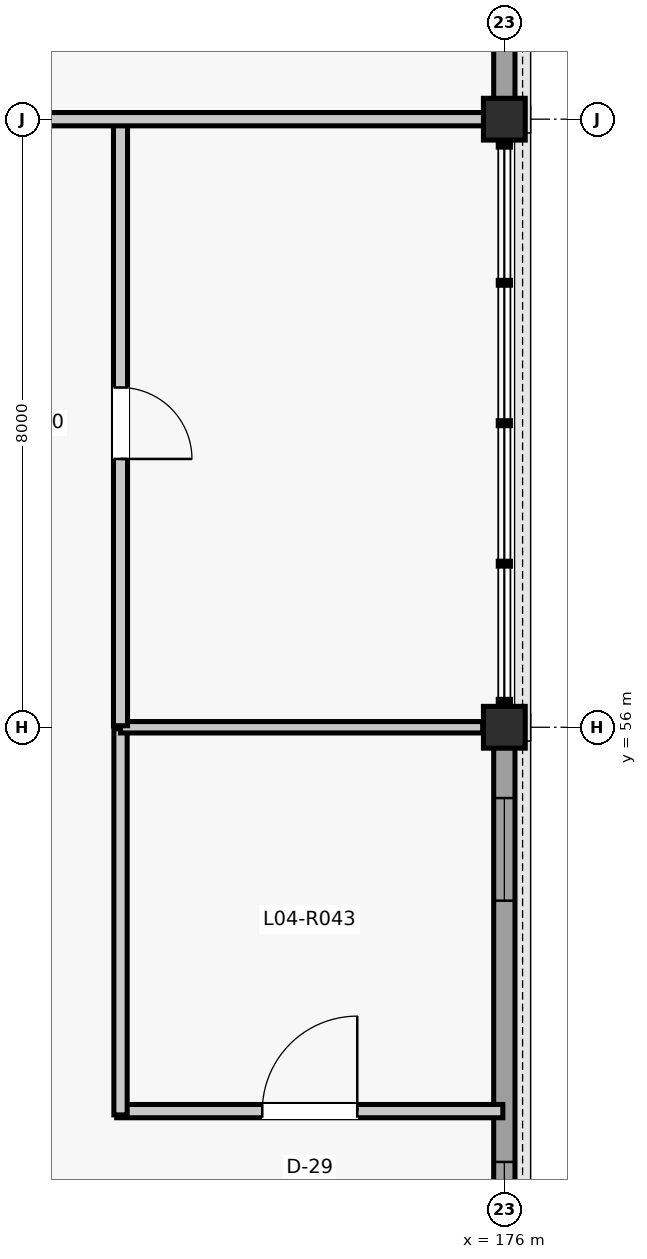
"""IFC4 building model, lengths in metres.
Left out: names, types, materials, properties, quantities, classifications, styles, units other than length and angle.
Written with IfcOpenShell. Run it as: python <this file> out.ifc"""

import sys

from ifc_helpers import new_model, si_unit, direction, frame, frame_2d, origin, origin_2d, place, context, subcontext, project, spatial, rectangle, extrude, element, fill, save


model = new_model("IFC4")
c1 = context("Model", 3, precision=1e-05, world=origin(), true_north=direction((0.0, 1.0)))
c2 = subcontext(c1, "Body", "Model", "MODEL_VIEW")
j1 = project(units=[si_unit("LENGTHUNIT", "METRE"), si_unit("PLANEANGLEUNIT", "RADIAN")], contexts=[c1])
p1 = place(None, origin())
s1 = spatial("IfcSite", under=j1, at=p1, CompositionType="ELEMENT")
p2 = place(p1, origin())
s2 = spatial("IfcBuilding", under=s1, at=p2, CompositionType="ELEMENT")
p3 = place(p2, frame((0.0, 0.0, 17.82)))
s3 = spatial("IfcBuildingStorey", under=s2, at=p3, CompositionType="ELEMENT", Elevation=17.82)
for number, where, z_axis, x_axis in (
    (1, (176.0, 56.0, 0.0), (0.0, 0.0, 1.0), (1.0, 0.0, 0.0)),
    (2, (176.0, 64.0, 0.0), (0.0, 0.0, 1.0), (1.0, 0.0, 0.0)),
):
    element("IfcColumn", number, at=place(p3, frame(where, z_axis=z_axis, x_axis=x_axis)), inside=s3, PredefinedType="COLUMN", context=c2, shape_type="SweptSolid", body=[
        extrude(rectangle(XDim=0.55, YDim=0.55, at=origin_2d()), origin(), (0.0, 0.0, 1.0), 3.96),
    ])
p4 = place(p3, frame((176.0, 48.26, 0.0), z_axis=(0.0, 0.0, 1.0), x_axis=(0.0, 1.0, 0.0)))
e3 = element("IfcWall", 3, at=p4, inside=s3, PredefinedType="SOLIDWALL", context=c2, shape_type="SweptSolid", body=[
    extrude(rectangle(XDim=7.48, YDim=0.28, at=frame_2d((3.74, 0.0))), origin(), (0.0, 0.0, 1.0), 3.285),
])
p5 = place(p4, frame((0.671, 0.0, 0.95)))
e4 = element("IfcOpeningElement", 4, at=p5, cuts=e3, PredefinedType="OPENING", context=c2, shape_type="SweptSolid", body=[
    extrude(rectangle(XDim=1.35, YDim=1.9, at=frame_2d((0.675, 0.95))), frame((0.0, 0.15, 0.0), z_axis=(0.0, -1.0, 0.0), x_axis=(1.0, 0.0, 0.0)), (0.0, 0.0, 1.0), 0.3),
])
p6 = place(p4, frame((5.458, 0.0, 0.95)))
e5 = element("IfcOpeningElement", 5, at=p6, cuts=e3, PredefinedType="OPENING", context=c2, shape_type="SweptSolid", body=[
    extrude(rectangle(XDim=1.35, YDim=1.9, at=frame_2d((0.675, 0.95))), frame((0.0, 0.15, 0.0), z_axis=(0.0, -1.0, 0.0), x_axis=(1.0, 0.0, 0.0)), (0.0, 0.0, 1.0), 0.3),
])
p7 = place(p3, frame((176.0, 64.26, 0.0), z_axis=(0.0, 0.0, 1.0), x_axis=(0.0, 1.0, 0.0)))
e6 = element("IfcWall", 6, at=p7, inside=s3, PredefinedType="SOLIDWALL", context=c2, shape_type="SweptSolid", body=[
    extrude(rectangle(XDim=7.48, YDim=0.28, at=frame_2d((3.74, 0.0))), origin(), (0.0, 0.0, 1.0), 3.289),
])
p8 = place(p7, frame((2.64, 0.0, 0.9)))
e7 = element("IfcOpeningElement", 7, at=p8, cuts=e6, PredefinedType="OPENING", context=c2, shape_type="SweptSolid", body=[
    extrude(rectangle(XDim=2.2, YDim=2.0, at=frame_2d((1.1, 1.0))), frame((0.0, 0.15, 0.0), z_axis=(0.0, -1.0, 0.0), x_axis=(1.0, 0.0, 0.0)), (0.0, 0.0, 1.0), 0.3),
])
p9 = place(p3, frame((170.9, 50.95, 0.0), z_axis=(0.0, 0.0, 1.0), x_axis=(1.0, 0.0, 0.0)))
e8 = element("IfcWall", 8, at=p9, inside=s3, PredefinedType="PARTITIONING", context=c2, shape_type="SweptSolid", body=[
    extrude(rectangle(XDim=5.08, YDim=0.175, at=frame_2d((2.54, 0.0))), origin(), (0.0, 0.0, 1.0), 3.278),
])
p10 = place(p9, frame((1.915, 0.0, 0.0)))
e9 = element("IfcOpeningElement", 9, at=p10, cuts=e8, PredefinedType="OPENING", context=c2, shape_type="SweptSolid", body=[
    extrude(rectangle(XDim=1.25, YDim=2.18, at=frame_2d((0.625, 1.09))), frame((0.0, 0.097, 0.0), z_axis=(0.0, -1.0, 0.0), x_axis=(1.0, 0.0, 0.0)), (0.0, 0.0, 1.0), 0.195),
])
p11 = place(p3, frame((170.95, 50.9, 0.0), z_axis=(0.0, 0.0, 1.0), x_axis=(0.0, 1.0, 0.0)))
e10 = element("IfcWall", 10, at=p11, inside=s3, PredefinedType="PARTITIONING", context=c2, shape_type="SweptSolid", body=[
    extrude(rectangle(XDim=5.08, YDim=0.175, at=frame_2d((2.54, 0.0))), origin(), (0.0, 0.0, 1.0), 3.232),
])
p12 = place(p3, frame((170.95, 56.0, 0.0), z_axis=(0.0, 0.0, 1.0), x_axis=(1.0, 0.0, 0.0)))
e11 = element("IfcWall", 11, at=p12, inside=s3, PredefinedType="PARTITIONING", context=c2, shape_type="SweptSolid", body=[
    extrude(rectangle(XDim=4.765, YDim=0.15, at=frame_2d((2.383, 0.0))), origin(), (0.0, 0.0, 1.0), 3.232),
])
p13 = place(p3, frame((170.95, 56.02, 0.0), z_axis=(0.0, 0.0, 1.0), x_axis=(0.0, 1.0, 0.0)))
e12 = element("IfcWall", 12, at=p13, inside=s3, PredefinedType="PARTITIONING", context=c2, shape_type="SweptSolid", body=[
    extrude(rectangle(XDim=7.96, YDim=0.185, at=frame_2d((3.98, 0.0))), origin(), (0.0, 0.0, 1.0), 3.232),
])
p14 = place(p13, frame((3.51, 0.0, 0.0)))
e13 = element("IfcOpeningElement", 13, at=p14, cuts=e12, PredefinedType="OPENING", context=c2, shape_type="SweptSolid", body=[
    extrude(rectangle(XDim=0.94, YDim=2.12, at=frame_2d((0.47, 1.06))), frame((0.0, 0.103, 0.0), z_axis=(0.0, -1.0, 0.0), x_axis=(1.0, 0.0, 0.0)), (0.0, 0.0, 1.0), 0.205),
])
p15 = place(p3, frame((168.265, 64.0, 0.0), z_axis=(0.0, 0.0, 1.0), x_axis=(1.0, 0.0, 0.0)))
e14 = element("IfcWall", 14, at=p15, inside=s3, PredefinedType="PARTITIONING", context=c2, shape_type="SweptSolid", body=[
    extrude(rectangle(XDim=7.47, YDim=0.175, at=frame_2d((3.735, 0.0))), origin(), (0.0, 0.0, 1.0), 3.238),
])
p16 = place(p15, frame((0.52, 0.0, 0.0)))
e15 = element("IfcOpeningElement", 15, at=p16, cuts=e14, PredefinedType="OPENING", context=c2, shape_type="SweptSolid", body=[
    extrude(rectangle(XDim=0.94, YDim=2.12, at=frame_2d((0.47, 1.06))), frame((0.0, 0.097, 0.0), z_axis=(0.0, -1.0, 0.0), x_axis=(1.0, 0.0, 0.0)), (0.0, 0.0, 1.0), 0.195),
])
p17 = place(p5, origin())
e16 = element("IfcWindow", 16, at=p17, inside=s3, PartitioningType="SINGLE_PANEL", PredefinedType="WINDOW", context=c2, shape_type="SweptSolid", body=[
    extrude(rectangle(XDim=1.35, YDim=1.9, at=frame_2d((0.675, 0.95))), frame((0.0, 0.03, 0.0), z_axis=(0.0, -1.0, 0.0), x_axis=(1.0, 0.0, 0.0)), (0.0, 0.0, 1.0), 0.06),
])
fill(e4, e16)
p18 = place(p6, origin())
e17 = element("IfcWindow", 17, at=p18, inside=s3, PartitioningType="SINGLE_PANEL", PredefinedType="WINDOW", context=c2, shape_type="SweptSolid", body=[
    extrude(rectangle(XDim=1.35, YDim=1.9, at=frame_2d((0.675, 0.95))), frame((0.0, 0.03, 0.0), z_axis=(0.0, -1.0, 0.0), x_axis=(1.0, 0.0, 0.0)), (0.0, 0.0, 1.0), 0.06),
])
fill(e5, e17)
p19 = place(p10, origin())
e18 = element("IfcDoor", 18, at=p19, inside=s3, OperationType="SINGLE_SWING_RIGHT", PredefinedType="DOOR", context=c2, shape_type="SweptSolid", body=[
    extrude(rectangle(XDim=1.25, YDim=2.18, at=frame_2d((0.625, 1.09))), frame((0.0, 0.025, 0.0), z_axis=(0.0, -1.0, 0.0), x_axis=(1.0, 0.0, 0.0)), (0.0, 0.0, 1.0), 0.05),
])
fill(e9, e18)
p20 = place(p14, frame((0.94, 0.0, 0.0), z_axis=(0.0, 0.0, 1.0), x_axis=(-1.0, 0.0, 0.0)))
e19 = element("IfcDoor", 19, at=p20, inside=s3, OperationType="SINGLE_SWING_LEFT", PredefinedType="DOOR", context=c2, shape_type="SweptSolid", body=[
    extrude(rectangle(XDim=0.94, YDim=2.12, at=frame_2d((0.47, 1.06))), frame((0.0, 0.025, 0.0), z_axis=(0.0, -1.0, 0.0), x_axis=(1.0, 0.0, 0.0)), (0.0, 0.0, 1.0), 0.05),
])
fill(e13, e19)
save(model, sys.argv[1])
